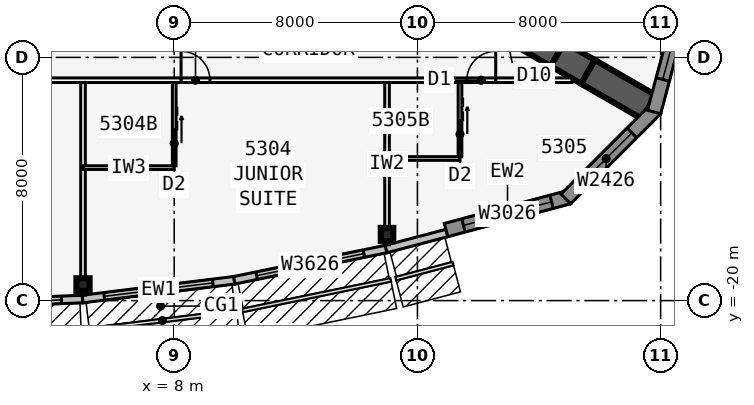
"""IFC4 building model, lengths in metres.
Left out: names, types, materials, properties, quantities, classifications, styles, units other than length and angle.
Written with IfcOpenShell. Run it as: python <this file> out.ifc"""

import sys

from ifc_helpers import new_model, si_unit, direction, frame, frame_2d, origin, origin_2d, place, context, subcontext, project, spatial, polyline, rectangle, i_section, outline, extrude, element, fill, save


model = new_model("IFC4")
c1 = context("Model", 3, precision=1e-05, world=origin(), true_north=direction((0.0, 1.0)))
c2 = subcontext(c1, "Body", "Model", "MODEL_VIEW")
j1 = project(units=[si_unit("LENGTHUNIT", "METRE"), si_unit("PLANEANGLEUNIT", "RADIAN")], contexts=[c1])
p1 = place(None, origin())
s1 = spatial("IfcSite", under=j1, at=p1, CompositionType="ELEMENT")
p2 = place(p1, origin())
s2 = spatial("IfcBuilding", under=s1, at=p2, CompositionType="ELEMENT")
p3 = place(p2, frame((0.0, 0.0, 200.9)))
s3 = spatial("IfcBuildingStorey", under=s2, at=p3, CompositionType="ELEMENT", Elevation=200.9)
p4 = place(p3, frame((16.5, -9.526, 0.0), z_axis=(0.0, 0.0, 1.0), x_axis=(0.866031398331, -0.499989616998, 0.0)))
e1 = element("IfcWall", 1, at=p4, inside=s3, PredefinedType="SHEAR", context=c2, shape_type="SweptSolid", body=[
    extrude(rectangle(XDim=4.746, YDim=0.9, at=frame_2d((2.373, 0.0))), origin(), (0.0, 0.0, 1.0), 3.6),
])
p5 = place(p4, frame((1.8, 0.0, 0.0)))
e2 = element("IfcOpeningElement", 2, at=p5, cuts=e1, PredefinedType="OPENING", context=c2, shape_type="SweptSolid", body=[
    extrude(rectangle(XDim=1.8, YDim=2.13, at=frame_2d((0.9, 1.065))), frame((0.0, 0.46, 0.0), z_axis=(0.0, -1.0, 0.0), x_axis=(1.0, 0.0, 0.0)), (0.0, 0.0, 1.0), 0.92),
])
p6 = place(p3, frame((20.61, -11.899, 0.0), z_axis=(0.0, 0.0, 1.0), x_axis=(0.866009537788, -0.500027479704, 0.0)))
e3 = element("IfcWall", 3, at=p6, inside=s3, PredefinedType="SHEAR", context=c2, shape_type="SweptSolid", body=[
    extrude(rectangle(XDim=1.155, YDim=0.9, at=frame_2d((0.577, 0.0))), origin(), (0.0, 0.0, 1.0), 3.6),
])
p7 = place(p3, frame((21.61, -12.477, 0.0), z_axis=(0.0, 0.0, 1.0), x_axis=(0.866055313784, -0.499948190782, 0.0)))
e4 = element("IfcWall", 4, at=p7, inside=s3, PredefinedType="SHEAR", context=c2, shape_type="SweptSolid", body=[
    extrude(rectangle(XDim=2.309, YDim=0.9, at=frame_2d((1.155, 0.0))), origin(), (0.0, 0.0, 1.0), 3.6),
])
for number, where, z_axis, x_axis in (
    (5, (5.0, -19.472, 0.0), (0.0, 0.0, 1.0), (0.0, -1.0, 0.0)),
    (6, (15.0, -17.825, 0.0), (0.0, 0.0, 1.0), (1.0, 0.0, 0.0)),
):
    element("IfcColumn", number, at=place(p3, frame(where, z_axis=z_axis, x_axis=x_axis)), inside=s3, PredefinedType="COLUMN", context=c2, shape_type="SweptSolid", body=[
        extrude(i_section(OverallWidth=0.411, OverallDepth=0.434, WebThickness=0.036, FlangeThickness=0.057, at=origin_2d()), origin(), (0.0, 0.0, 1.0), 3.6),
    ])
p8 = place(p3, frame((-0.005, -20.153, 0.0), z_axis=(0.0, 0.0, 1.0), x_axis=(0.999151909423, 0.041175986892, 0.0)))
e7 = element("IfcWall", 7, at=p8, inside=s3, PredefinedType="STANDARD", context=c2, shape_type="SweptSolid", body=[
    extrude(rectangle(XDim=5.004, YDim=0.25, at=frame_2d((2.502, 0.0))), origin(), (0.0, 0.0, 1.0), 3.435),
])
p9 = place(p8, frame((0.702, 0.0, 0.45)))
e8 = element("IfcOpeningElement", 8, at=p9, cuts=e7, PredefinedType="OPENING", context=c2, shape_type="SweptSolid", body=[
    extrude(rectangle(XDim=3.6, YDim=2.6, at=frame_2d((1.8, 1.3))), frame((0.0, 0.135, 0.0), z_axis=(0.0, -1.0, 0.0), x_axis=(1.0, 0.0, 0.0)), (0.0, 0.0, 1.0), 0.27),
])
p10 = place(p3, frame((4.985, -19.948, 0.0), z_axis=(0.0, 0.0, 1.0), x_axis=(0.992449874964, 0.12265090984, 0.0)))
e9 = element("IfcWall", 9, at=p10, inside=s3, PredefinedType="STANDARD", context=c2, shape_type="SweptSolid", body=[
    extrude(rectangle(XDim=5.038, YDim=0.25, at=frame_2d((2.519, 0.0))), origin(), (0.0, 0.0, 1.0), 3.435),
])
p11 = place(p10, frame((0.719, 0.0, 0.45)))
e10 = element("IfcOpeningElement", 10, at=p11, cuts=e9, PredefinedType="OPENING", context=c2, shape_type="SweptSolid", body=[
    extrude(rectangle(XDim=3.6, YDim=2.6, at=frame_2d((1.8, 1.3))), frame((0.0, 0.135, 0.0), z_axis=(0.0, -1.0, 0.0), x_axis=(1.0, 0.0, 0.0)), (0.0, 0.0, 1.0), 0.27),
])
p12 = place(p3, frame((9.975, -19.332, 0.0), z_axis=(0.0, 0.0, 1.0), x_axis=(0.979461488189, 0.201631329795, 0.0)))
e11 = element("IfcWall", 11, at=p12, inside=s3, PredefinedType="STANDARD", context=c2, shape_type="SweptSolid", body=[
    extrude(rectangle(XDim=5.105, YDim=0.25, at=frame_2d((2.552, 0.0))), origin(), (0.0, 0.0, 1.0), 3.435),
])
p13 = place(p12, frame((0.752, 0.0, 0.45)))
e12 = element("IfcOpeningElement", 12, at=p13, cuts=e11, PredefinedType="OPENING", context=c2, shape_type="SweptSolid", body=[
    extrude(rectangle(XDim=3.6, YDim=2.6, at=frame_2d((1.8, 1.3))), frame((0.0, 0.135, 0.0), z_axis=(0.0, -1.0, 0.0), x_axis=(1.0, 0.0, 0.0)), (0.0, 0.0, 1.0), 0.27),
])
p14 = place(p3, frame((14.968, -18.304, 0.0), z_axis=(0.0, 0.0, 1.0), x_axis=(0.967010286052, 0.254737328772, 0.0)))
e13 = element("IfcWall", 13, at=p14, inside=s3, PredefinedType="STANDARD", context=c2, shape_type="SweptSolid", body=[
    extrude(rectangle(XDim=2.068, YDim=0.25, at=frame_2d((1.034, 0.0))), origin(), (0.0, 0.0, 1.0), 3.435),
])
p15 = place(p3, frame((16.942, -17.681, 0.0), z_axis=(0.0, 0.0, 1.0), x_axis=(0.965920442324, 0.258839137498, 0.0)))
e14 = element("IfcWall", 14, at=p15, inside=s3, PredefinedType="SOLIDWALL", context=c2, shape_type="SweptSolid", body=[
    extrude(rectangle(XDim=4.184, YDim=0.45, at=frame_2d((2.092, 0.0))), origin(), (0.0, 0.0, 1.0), 3.435),
])
p16 = place(p15, frame((0.592, 0.0, 0.45)))
e15 = element("IfcOpeningElement", 15, at=p16, cuts=e14, PredefinedType="OPENING", context=c2, shape_type="SweptSolid", body=[
    extrude(rectangle(XDim=3.0, YDim=2.6, at=frame_2d((1.5, 1.3))), frame((0.0, 0.235, 0.0), z_axis=(0.0, -1.0, 0.0), x_axis=(1.0, 0.0, 0.0)), (0.0, 0.0, 1.0), 0.47),
])
p17 = place(p3, frame((20.882, -16.656, 0.0), z_axis=(0.0, 0.0, 1.0), x_axis=(0.707077605902, 0.707135955267, 0.0)))
e16 = element("IfcWall", 16, at=p17, inside=s3, PredefinedType="SOLIDWALL", context=c2, shape_type="SweptSolid", body=[
    extrude(outline(polyline([(4.184, 0.225), (4.125, 0.225), (3.633, 0.093), (3.598, 0.225), (0.0, 0.225), (0.0, -0.225), (4.184, -0.225), (4.184, 0.225)])), origin(), (0.0, 0.0, 1.0), 3.435),
])
p18 = place(p17, frame((0.674, 0.0, 0.45)))
e17 = element("IfcOpeningElement", 17, at=p18, cuts=e16, PredefinedType="OPENING", context=c2, shape_type="SweptSolid", body=[
    extrude(rectangle(XDim=2.4, YDim=2.6, at=frame_2d((1.2, 1.3))), frame((0.0, 0.235, 0.0), z_axis=(0.0, -1.0, 0.0), x_axis=(1.0, 0.0, 0.0)), (0.0, 0.0, 1.0), 0.47),
])
p19 = place(p3, frame((23.783, -13.798, 0.0), z_axis=(0.0, 0.0, 1.0), x_axis=(0.258799282522, 0.96593112144, 0.0)))
e18 = element("IfcWall", 18, at=p19, inside=s3, PredefinedType="SOLIDWALL", context=c2, shape_type="SweptSolid", body=[
    extrude(outline(polyline([(4.184, 0.225), (0.586, 0.225), (0.551, 0.093), (0.059, 0.225), (0.0, 0.225), (0.0, -0.225), (4.184, -0.225), (4.184, 0.225)])), origin(), (0.0, 0.0, 1.0), 3.435),
])
p20 = place(p19, frame((1.11, 0.0, 0.45)))
e19 = element("IfcOpeningElement", 19, at=p20, cuts=e18, PredefinedType="OPENING", context=c2, shape_type="SweptSolid", body=[
    extrude(rectangle(XDim=2.4, YDim=2.6, at=frame_2d((1.2, 1.3))), frame((0.0, 0.235, 0.0), z_axis=(0.0, -1.0, 0.0), x_axis=(1.0, 0.0, 0.0)), (0.0, 0.0, 1.0), 0.47),
])
p21 = place(p3, frame((-21.086, -12.751, 0.0), z_axis=(0.0, 0.0, 1.0), x_axis=(1.0, 0.0, 0.0)))
e20 = element("IfcWall", 20, at=p21, inside=s3, PredefinedType="PARTITIONING", context=c2, shape_type="SweptSolid", body=[
    extrude(rectangle(XDim=42.172, YDim=0.15, at=frame_2d((21.086, 0.0))), origin(), (0.0, 0.0, 1.0), 3.435),
])
p22 = place(p21, frame((2.511, 0.0, 0.0)))
e21 = element("IfcOpeningElement", 21, at=p22, cuts=e20, PredefinedType="OPENING", context=c2, shape_type="SweptSolid", body=[
    extrude(rectangle(XDim=0.95, YDim=2.13, at=frame_2d((0.475, 1.065))), frame((0.0, 0.085, 0.0), z_axis=(0.0, -1.0, 0.0), x_axis=(1.0, 0.0, 0.0)), (0.0, 0.0, 1.0), 0.17),
])
p23 = place(p21, frame((8.111, 0.0, 0.0)))
e22 = element("IfcOpeningElement", 22, at=p23, cuts=e20, PredefinedType="OPENING", context=c2, shape_type="SweptSolid", body=[
    extrude(rectangle(XDim=0.95, YDim=2.13, at=frame_2d((0.475, 1.065))), frame((0.0, 0.085, 0.0), z_axis=(0.0, -1.0, 0.0), x_axis=(1.0, 0.0, 0.0)), (0.0, 0.0, 1.0), 0.17),
])
p24 = place(p21, frame((18.711, 0.0, 0.0)))
e23 = element("IfcOpeningElement", 23, at=p24, cuts=e20, PredefinedType="OPENING", context=c2, shape_type="SweptSolid", body=[
    extrude(rectangle(XDim=0.95, YDim=2.13, at=frame_2d((0.475, 1.065))), frame((0.0, 0.085, 0.0), z_axis=(0.0, -1.0, 0.0), x_axis=(1.0, 0.0, 0.0)), (0.0, 0.0, 1.0), 0.17),
])
p25 = place(p21, frame((23.086, 0.0, 0.0)))
e24 = element("IfcOpeningElement", 24, at=p25, cuts=e20, PredefinedType="OPENING", context=c2, shape_type="SweptSolid", body=[
    extrude(rectangle(XDim=1.0, YDim=2.13, at=frame_2d((0.5, 1.065))), frame((0.0, 0.085, 0.0), z_axis=(0.0, -1.0, 0.0), x_axis=(1.0, 0.0, 0.0)), (0.0, 0.0, 1.0), 0.17),
])
p26 = place(p21, frame((29.311, 0.0, 0.0)))
e25 = element("IfcOpeningElement", 25, at=p26, cuts=e20, PredefinedType="OPENING", context=c2, shape_type="SweptSolid", body=[
    extrude(rectangle(XDim=0.95, YDim=2.13, at=frame_2d((0.475, 1.065))), frame((0.0, 0.085, 0.0), z_axis=(0.0, -1.0, 0.0), x_axis=(1.0, 0.0, 0.0)), (0.0, 0.0, 1.0), 0.17),
])
p27 = place(p21, frame((38.711, 0.0, 0.0)))
e26 = element("IfcOpeningElement", 26, at=p27, cuts=e20, PredefinedType="OPENING", context=c2, shape_type="SweptSolid", body=[
    extrude(rectangle(XDim=0.95, YDim=2.13, at=frame_2d((0.475, 1.065))), frame((0.0, 0.085, 0.0), z_axis=(0.0, -1.0, 0.0), x_axis=(1.0, 0.0, 0.0)), (0.0, 0.0, 1.0), 0.17),
])
p28 = place(p3, frame((5.0, -12.826, 0.0), z_axis=(0.0, 0.0, 1.0), x_axis=(0.0, -1.0, 0.0)))
e27 = element("IfcWall", 27, at=p28, inside=s3, PredefinedType="PARTITIONING", context=c2, shape_type="SweptSolid", body=[
    extrude(rectangle(XDim=6.994, YDim=0.15, at=frame_2d((3.497, 0.0))), origin(), (0.0, 0.0, 1.0), 2.589),
])
p29 = place(p3, frame((15.0, -12.826, 0.0), z_axis=(0.0, 0.0, 1.0), x_axis=(0.0, -1.0, 0.0)))
e28 = element("IfcWall", 28, at=p29, inside=s3, PredefinedType="PARTITIONING", context=c2, shape_type="SweptSolid", body=[
    extrude(rectangle(XDim=5.34, YDim=0.15, at=frame_2d((2.67, 0.0))), origin(), (0.0, 0.0, 1.0), 2.589),
])
p30 = place(p3, frame((5.0, -15.626, 0.0), z_axis=(0.0, 0.0, 1.0), x_axis=(1.0, 0.0, 0.0)))
e29 = element("IfcWall", 29, at=p30, inside=s3, PredefinedType="PLUMBINGWALL", context=c2, shape_type="SweptSolid", body=[
    extrude(rectangle(XDim=3.0, YDim=0.12, at=frame_2d((1.5, 0.0))), origin(), (0.0, 0.0, 1.0), 3.435),
])
p31 = place(p3, frame((8.0, -12.826, 0.0), z_axis=(0.0, 0.0, 1.0), x_axis=(0.0, -1.0, 0.0)))
e30 = element("IfcWall", 30, at=p31, inside=s3, PredefinedType="PLUMBINGWALL", context=c2, shape_type="SweptSolid", body=[
    extrude(rectangle(XDim=2.74, YDim=0.12, at=frame_2d((1.37, 0.0))), origin(), (0.0, 0.0, 1.0), 3.435),
])
p32 = place(p31, frame((1.55, 0.0, 0.0)))
e31 = element("IfcOpeningElement", 31, at=p32, cuts=e30, PredefinedType="OPENING", context=c2, shape_type="SweptSolid", body=[
    extrude(rectangle(XDim=0.9, YDim=2.13, at=frame_2d((0.45, 1.065))), frame((0.0, 0.07, 0.0), z_axis=(0.0, -1.0, 0.0), x_axis=(1.0, 0.0, 0.0)), (0.0, 0.0, 1.0), 0.14),
])
p33 = place(p3, frame((15.0, -15.326, 0.0), z_axis=(0.0, 0.0, 1.0), x_axis=(1.0, 0.0, 0.0)))
e32 = element("IfcWall", 32, at=p33, inside=s3, PredefinedType="PLUMBINGWALL", context=c2, shape_type="SweptSolid", body=[
    extrude(rectangle(XDim=2.4, YDim=0.12, at=frame_2d((1.2, 0.0))), origin(), (0.0, 0.0, 1.0), 3.435),
])
p34 = place(p3, frame((17.4, -12.826, 0.0), z_axis=(0.0, 0.0, 1.0), x_axis=(0.0, -1.0, 0.0)))
e33 = element("IfcWall", 33, at=p34, inside=s3, PredefinedType="PLUMBINGWALL", context=c2, shape_type="SweptSolid", body=[
    extrude(rectangle(XDim=2.44, YDim=0.12, at=frame_2d((1.22, 0.0))), origin(), (0.0, 0.0, 1.0), 3.435),
])
p35 = place(p34, frame((1.25, 0.0, 0.0)))
e34 = element("IfcOpeningElement", 34, at=p35, cuts=e33, PredefinedType="OPENING", context=c2, shape_type="SweptSolid", body=[
    extrude(rectangle(XDim=0.9, YDim=2.13, at=frame_2d((0.45, 1.065))), frame((0.0, 0.07, 0.0), z_axis=(0.0, -1.0, 0.0), x_axis=(1.0, 0.0, 0.0)), (0.0, 0.0, 1.0), 0.14),
])
p36 = place(p9, origin())
e35 = element("IfcWindow", 35, at=p36, inside=s3, PartitioningType="SINGLE_PANEL", PredefinedType="WINDOW", context=c2, shape_type="SweptSolid", body=[
    extrude(rectangle(XDim=3.6, YDim=2.6, at=frame_2d((1.8, 1.3))), frame((0.0, 0.03, 0.0), z_axis=(0.0, -1.0, 0.0), x_axis=(1.0, 0.0, 0.0)), (0.0, 0.0, 1.0), 0.06),
])
fill(e8, e35)
p37 = place(p11, origin())
e36 = element("IfcWindow", 36, at=p37, inside=s3, PartitioningType="SINGLE_PANEL", PredefinedType="WINDOW", context=c2, shape_type="SweptSolid", body=[
    extrude(rectangle(XDim=3.6, YDim=2.6, at=frame_2d((1.8, 1.3))), frame((0.0, 0.03, 0.0), z_axis=(0.0, -1.0, 0.0), x_axis=(1.0, 0.0, 0.0)), (0.0, 0.0, 1.0), 0.06),
])
fill(e10, e36)
p38 = place(p13, origin())
e37 = element("IfcWindow", 37, at=p38, inside=s3, PartitioningType="SINGLE_PANEL", PredefinedType="WINDOW", context=c2, shape_type="SweptSolid", body=[
    extrude(rectangle(XDim=3.6, YDim=2.6, at=frame_2d((1.8, 1.3))), frame((0.0, 0.03, 0.0), z_axis=(0.0, -1.0, 0.0), x_axis=(1.0, 0.0, 0.0)), (0.0, 0.0, 1.0), 0.06),
])
fill(e12, e37)
p39 = place(p16, origin())
e38 = element("IfcWindow", 38, at=p39, inside=s3, PartitioningType="SINGLE_PANEL", PredefinedType="WINDOW", context=c2, shape_type="SweptSolid", body=[
    extrude(rectangle(XDim=3.0, YDim=2.6, at=frame_2d((1.5, 1.3))), frame((0.0, 0.03, 0.0), z_axis=(0.0, -1.0, 0.0), x_axis=(1.0, 0.0, 0.0)), (0.0, 0.0, 1.0), 0.06),
])
fill(e15, e38)
p40 = place(p18, origin())
e39 = element("IfcWindow", 39, at=p40, inside=s3, PartitioningType="SINGLE_PANEL", PredefinedType="WINDOW", context=c2, shape_type="SweptSolid", body=[
    extrude(rectangle(XDim=2.4, YDim=2.6, at=frame_2d((1.2, 1.3))), frame((0.0, 0.03, 0.0), z_axis=(0.0, -1.0, 0.0), x_axis=(1.0, 0.0, 0.0)), (0.0, 0.0, 1.0), 0.06),
])
fill(e17, e39)
p41 = place(p20, origin())
e40 = element("IfcWindow", 40, at=p41, inside=s3, PartitioningType="SINGLE_PANEL", PredefinedType="WINDOW", context=c2, shape_type="SweptSolid", body=[
    extrude(rectangle(XDim=2.4, YDim=2.6, at=frame_2d((1.2, 1.3))), frame((0.0, 0.03, 0.0), z_axis=(0.0, -1.0, 0.0), x_axis=(1.0, 0.0, 0.0)), (0.0, 0.0, 1.0), 0.06),
])
fill(e19, e40)
p42 = place(p32, origin())
e41 = element("IfcDoor", 41, at=p42, inside=s3, OperationType="SLIDING_TO_LEFT", PredefinedType="DOOR", context=c2, shape_type="SweptSolid", body=[
    extrude(rectangle(XDim=0.9, YDim=2.13, at=frame_2d((0.45, 1.065))), frame((0.0, 0.025, 0.0), z_axis=(0.0, -1.0, 0.0), x_axis=(1.0, 0.0, 0.0)), (0.0, 0.0, 1.0), 0.05),
])
fill(e31, e41)
p43 = place(p26, origin())
e42 = element("IfcDoor", 42, at=p43, inside=s3, OperationType="SINGLE_SWING_LEFT", PredefinedType="DOOR", context=c2, shape_type="SweptSolid", body=[
    extrude(rectangle(XDim=0.95, YDim=2.13, at=frame_2d((0.475, 1.065))), frame((0.0, 0.025, 0.0), z_axis=(0.0, -1.0, 0.0), x_axis=(1.0, 0.0, 0.0)), (0.0, 0.0, 1.0), 0.05),
])
fill(e25, e42)
p44 = place(p35, origin())
e43 = element("IfcDoor", 43, at=p44, inside=s3, OperationType="SLIDING_TO_LEFT", PredefinedType="DOOR", context=c2, shape_type="SweptSolid", body=[
    extrude(rectangle(XDim=0.9, YDim=2.13, at=frame_2d((0.45, 1.065))), frame((0.0, 0.025, 0.0), z_axis=(0.0, -1.0, 0.0), x_axis=(1.0, 0.0, 0.0)), (0.0, 0.0, 1.0), 0.05),
])
fill(e34, e43)
p45 = place(p27, origin())
e44 = element("IfcDoor", 44, at=p45, inside=s3, OperationType="SINGLE_SWING_RIGHT", PredefinedType="DOOR", context=c2, shape_type="SweptSolid", body=[
    extrude(rectangle(XDim=0.95, YDim=2.13, at=frame_2d((0.475, 1.065))), frame((0.0, 0.025, 0.0), z_axis=(0.0, -1.0, 0.0), x_axis=(1.0, 0.0, 0.0)), (0.0, 0.0, 1.0), 0.05),
])
fill(e26, e44)
save(model, sys.argv[1])
